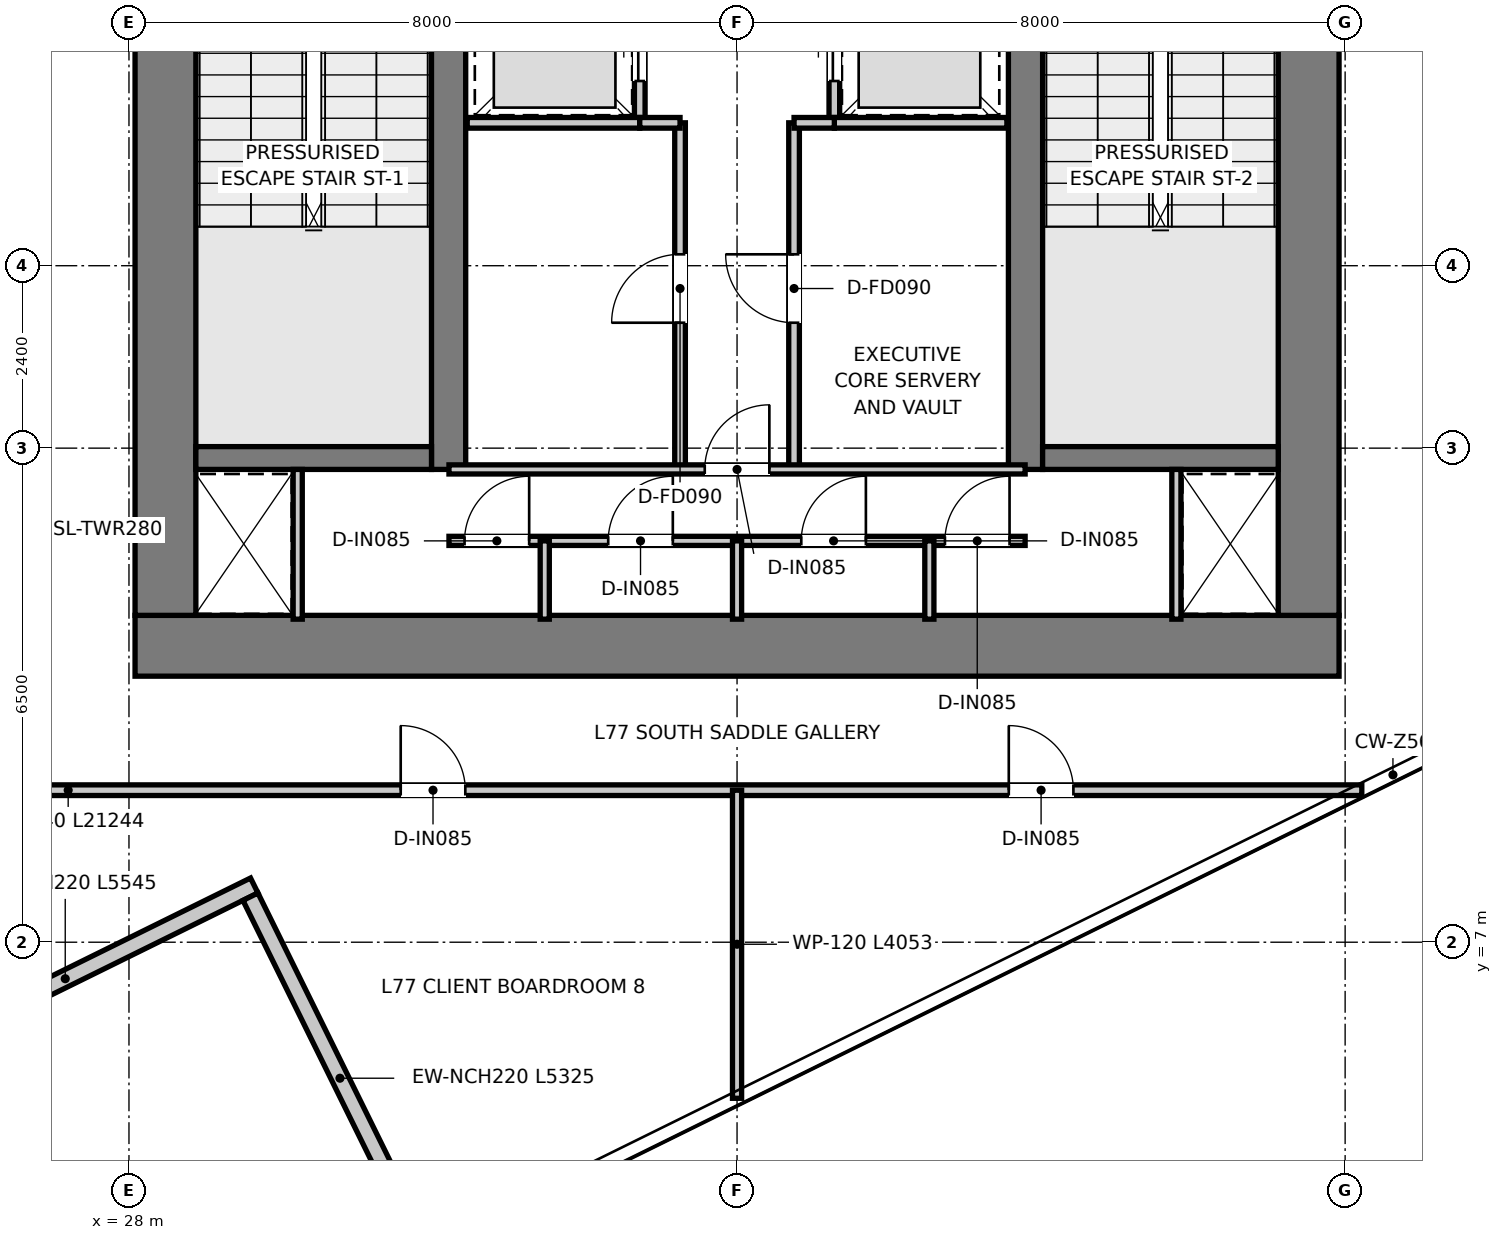
"""IFC4 building model, lengths in metres.
Left out: names, types, materials, properties, quantities, classifications, styles, units other than length and angle.
Written with IfcOpenShell. Run it as: python <this file> out.ifc"""

import sys

from ifc_helpers import new_model, si_unit, direction, frame, frame_2d, origin, place, context, subcontext, project, spatial, rectangle, extrude, element, fill, save


model = new_model("IFC4")
c1 = context("Model", 3, precision=1e-05, world=origin(), true_north=direction((0.0, 1.0)))
c2 = subcontext(c1, "Body", "Model", "MODEL_VIEW")
j1 = project(units=[si_unit("LENGTHUNIT", "METRE"), si_unit("PLANEANGLEUNIT", "RADIAN")], contexts=[c1])
p1 = place(None, origin())
s1 = spatial("IfcSite", under=j1, at=p1, CompositionType="ELEMENT")
p2 = place(p1, origin())
s2 = spatial("IfcBuilding", under=s1, at=p2, CompositionType="ELEMENT")
p3 = place(p2, frame((0.0, 0.0, 314.8)))
s3 = spatial("IfcBuildingStorey", under=s2, at=p3, CompositionType="ELEMENT", Elevation=314.8)
p4 = place(p3, frame((28.08, 10.9, 0.0), z_axis=(0.0, 0.0, 1.0), x_axis=(1.0, 0.0, 0.0)))
e1 = element("IfcWall", 1, at=p4, inside=s3, PredefinedType="SHEAR", context=c2, shape_type="SweptSolid", body=[
    extrude(rectangle(XDim=15.84, YDim=0.8, at=frame_2d((7.92, 0.0))), origin(), (0.0, 0.0, 1.0), 3.95),
])
for number, where, z_axis, x_axis in (
    (2, (28.48, 11.3, 0.0), (0.0, 0.0, 1.0), (0.0, 1.0, 0.0)),
    (3, (43.52, 11.3, 0.0), (0.0, 0.0, 1.0), (0.0, 1.0, 0.0)),
):
    element("IfcWall", number, at=place(p3, frame(where, z_axis=z_axis, x_axis=x_axis)), inside=s3, PredefinedType="SHEAR", context=c2, shape_type="SweptSolid", body=[
        extrude(rectangle(XDim=14.7, YDim=0.8, at=frame_2d((7.35, 0.0))), origin(), (0.0, 0.0, 1.0), 3.95),
    ])
p5 = place(p3, frame((32.205, 13.22, 0.0), z_axis=(0.0, 0.0, 1.0), x_axis=(0.0, 1.0, 0.0)))
e4 = element("IfcWall", 4, at=p5, inside=s3, PredefinedType="SHEAR", context=c2, shape_type="SweptSolid", body=[
    extrude(rectangle(XDim=12.78, YDim=0.45, at=frame_2d((6.39, 0.0))), origin(), (0.0, 0.0, 1.0), 3.95),
])
p6 = place(p5, frame((10.58, 0.0, 0.0)))
e5 = element("IfcOpeningElement", 5, at=p6, cuts=e4, PredefinedType="OPENING", context=c2, shape_type="SweptSolid", body=[
    extrude(rectangle(XDim=1.1, YDim=2.15, at=frame_2d((0.55, 1.075))), frame((0.0, 0.235, 0.0), z_axis=(0.0, -1.0, 0.0), x_axis=(1.0, 0.0, 0.0)), (0.0, 0.0, 1.0), 0.47),
])
p7 = place(p3, frame((39.795, 13.22, 0.0), z_axis=(0.0, 0.0, 1.0), x_axis=(0.0, 1.0, 0.0)))
e6 = element("IfcWall", 6, at=p7, inside=s3, PredefinedType="SHEAR", context=c2, shape_type="SweptSolid", body=[
    extrude(rectangle(XDim=12.78, YDim=0.45, at=frame_2d((6.39, 0.0))), origin(), (0.0, 0.0, 1.0), 3.95),
])
p8 = place(p7, frame((10.58, 0.0, 0.0)))
e7 = element("IfcOpeningElement", 7, at=p8, cuts=e6, PredefinedType="OPENING", context=c2, shape_type="SweptSolid", body=[
    extrude(rectangle(XDim=1.1, YDim=2.15, at=frame_2d((0.55, 1.075))), frame((0.0, 0.235, 0.0), z_axis=(0.0, -1.0, 0.0), x_axis=(1.0, 0.0, 0.0)), (0.0, 0.0, 1.0), 0.47),
])
for number, where, z_axis, x_axis in (
    (8, (28.88, 13.37, 0.0), (0.0, 0.0, 1.0), (1.0, 0.0, 0.0)),
    (9, (40.02, 13.37, 0.0), (0.0, 0.0, 1.0), (1.0, 0.0, 0.0)),
):
    element("IfcWall", number, at=place(p3, frame(where, z_axis=z_axis, x_axis=x_axis)), inside=s3, PredefinedType="SHEAR", context=c2, shape_type="SweptSolid", body=[
        extrude(rectangle(XDim=3.1, YDim=0.3, at=frame_2d((1.55, 0.0))), origin(), (0.0, 0.0, 1.0), 3.95),
    ])
p9 = place(p3, frame((24.675, 5.293, 0.0), z_axis=(0.0, 0.0, 1.0), x_axis=(0.896879244314, 0.442275503639, 0.0)))
e10 = element("IfcWall", 10, at=p9, inside=s3, PredefinedType="ELEMENTEDWALL", context=c2, shape_type="SweptSolid", body=[
    extrude(rectangle(XDim=5.545, YDim=0.22, at=frame_2d((2.772, 0.0))), origin(), (0.0, 0.0, 1.0), 3.59),
])
p10 = place(p3, frame((29.598, 7.599, 0.0), z_axis=(0.0, 0.0, 1.0), x_axis=(0.442291978932, -0.896871119712, 0.0)))
e11 = element("IfcWall", 11, at=p10, inside=s3, PredefinedType="ELEMENTEDWALL", context=c2, shape_type="SweptSolid", body=[
    extrude(rectangle(XDim=5.325, YDim=0.22, at=frame_2d((2.663, 0.0))), origin(), (0.0, 0.0, 1.0), 3.59),
])
p11 = place(p3, frame((34.72, 17.78, 0.0), z_axis=(0.0, 0.0, 1.0), x_axis=(0.0, 1.0, 0.0)))
e12 = element("IfcWall", 12, at=p11, inside=s3, PredefinedType="PARTITIONING", context=c2, shape_type="SweptSolid", body=[
    extrude(rectangle(XDim=2.42, YDim=0.14, at=frame_2d((1.21, 0.0))), origin(), (0.0, 0.0, 1.0), 3.59),
])
p12 = place(p11, frame((0.55, 0.0, 0.0)))
e13 = element("IfcOpeningElement", 13, at=p12, cuts=e12, PredefinedType="OPENING", context=c2, shape_type="SweptSolid", body=[
    extrude(rectangle(XDim=1.1, YDim=2.15, at=frame_2d((0.55, 1.075))), frame((0.0, 0.08, 0.0), z_axis=(0.0, -1.0, 0.0), x_axis=(1.0, 0.0, 0.0)), (0.0, 0.0, 1.0), 0.16),
])
p13 = place(p3, frame((37.28, 17.78, 0.0), z_axis=(0.0, 0.0, 1.0), x_axis=(0.0, 1.0, 0.0)))
e14 = element("IfcWall", 14, at=p13, inside=s3, PredefinedType="PARTITIONING", context=c2, shape_type="SweptSolid", body=[
    extrude(rectangle(XDim=2.42, YDim=0.14, at=frame_2d((1.21, 0.0))), origin(), (0.0, 0.0, 1.0), 3.59),
])
p14 = place(p13, frame((0.55, 0.0, 0.0)))
e15 = element("IfcOpeningElement", 15, at=p14, cuts=e14, PredefinedType="OPENING", context=c2, shape_type="SweptSolid", body=[
    extrude(rectangle(XDim=1.1, YDim=2.15, at=frame_2d((0.55, 1.075))), frame((0.0, 0.08, 0.0), z_axis=(0.0, -1.0, 0.0), x_axis=(1.0, 0.0, 0.0)), (0.0, 0.0, 1.0), 0.16),
])
for number, where, z_axis, x_axis in (
    (16, (32.45, 17.78, 0.0), (0.0, 0.0, 1.0), (1.0, 0.0, 0.0)),
    (17, (37.28, 17.78, 0.0), (0.0, 0.0, 1.0), (1.0, 0.0, 0.0)),
):
    element("IfcWall", number, at=place(p3, frame(where, z_axis=z_axis, x_axis=x_axis)), inside=s3, PredefinedType="PARTITIONING", context=c2, shape_type="SweptSolid", body=[
        extrude(rectangle(XDim=2.27, YDim=0.14, at=frame_2d((1.135, 0.0))), origin(), (0.0, 0.0, 1.0), 3.59),
    ])
p15 = place(p3, frame((35.25, 13.22, 0.0), z_axis=(0.0, 0.0, 1.0), x_axis=(0.0, 1.0, 0.0)))
e18 = element("IfcWall", 18, at=p15, inside=s3, PredefinedType="PARTITIONING", context=c2, shape_type="SweptSolid", body=[
    extrude(rectangle(XDim=4.56, YDim=0.14, at=frame_2d((2.28, 0.0))), origin(), (0.0, 0.0, 1.0), 3.59),
])
p16 = place(p15, frame((1.93, 0.0, 0.0)))
e19 = element("IfcOpeningElement", 19, at=p16, cuts=e18, PredefinedType="OPENING", context=c2, shape_type="SweptSolid", body=[
    extrude(rectangle(XDim=0.9, YDim=2.1, at=frame_2d((0.45, 1.05))), frame((0.0, 0.08, 0.0), z_axis=(0.0, -1.0, 0.0), x_axis=(1.0, 0.0, 0.0)), (0.0, 0.0, 1.0), 0.16),
])
p17 = place(p3, frame((34.72, 17.78, 0.0), z_axis=(0.0, 0.0, 1.0), x_axis=(1.0, 0.0, 0.0)))
e20 = element("IfcWall", 20, at=p17, inside=s3, PredefinedType="PARTITIONING", context=c2, shape_type="SweptSolid", body=[
    extrude(rectangle(XDim=0.53, YDim=0.14, at=frame_2d((0.265, 0.0))), origin(), (0.0, 0.0, 1.0), 3.59),
])
p18 = place(p3, frame((36.75, 13.22, 0.0), z_axis=(0.0, 0.0, 1.0), x_axis=(0.0, 1.0, 0.0)))
e21 = element("IfcWall", 21, at=p18, inside=s3, PredefinedType="PARTITIONING", context=c2, shape_type="SweptSolid", body=[
    extrude(rectangle(XDim=4.56, YDim=0.14, at=frame_2d((2.28, 0.0))), origin(), (0.0, 0.0, 1.0), 3.59),
])
p19 = place(p18, frame((1.93, 0.0, 0.0)))
e22 = element("IfcOpeningElement", 22, at=p19, cuts=e21, PredefinedType="OPENING", context=c2, shape_type="SweptSolid", body=[
    extrude(rectangle(XDim=0.9, YDim=2.1, at=frame_2d((0.45, 1.05))), frame((0.0, 0.08, 0.0), z_axis=(0.0, -1.0, 0.0), x_axis=(1.0, 0.0, 0.0)), (0.0, 0.0, 1.0), 0.16),
])
p20 = place(p3, frame((36.75, 17.78, 0.0), z_axis=(0.0, 0.0, 1.0), x_axis=(1.0, 0.0, 0.0)))
e23 = element("IfcWall", 23, at=p20, inside=s3, PredefinedType="PARTITIONING", context=c2, shape_type="SweptSolid", body=[
    extrude(rectangle(XDim=0.53, YDim=0.14, at=frame_2d((0.265, 0.0))), origin(), (0.0, 0.0, 1.0), 3.59),
])
for number, where, z_axis, x_axis in (
    (24, (30.22, 11.25, 0.0), (0.0, 0.0, 1.0), (0.0, 1.0, 0.0)),
    (25, (41.78, 11.25, 0.0), (0.0, 0.0, 1.0), (0.0, 1.0, 0.0)),
):
    element("IfcWall", number, at=place(p3, frame(where, z_axis=z_axis, x_axis=x_axis)), inside=s3, PredefinedType="PARTITIONING", context=c2, shape_type="SweptSolid", body=[
        extrude(rectangle(XDim=1.97, YDim=0.12, at=frame_2d((0.985, 0.0))), origin(), (0.0, 0.0, 1.0), 3.59),
    ])
p21 = place(p3, frame((32.21, 13.22, 0.0), z_axis=(0.0, 0.0, 1.0), x_axis=(1.0, 0.0, 0.0)))
e26 = element("IfcWall", 26, at=p21, inside=s3, PredefinedType="PARTITIONING", context=c2, shape_type="SweptSolid", body=[
    extrude(rectangle(XDim=7.58, YDim=0.12, at=frame_2d((3.79, 0.0))), origin(), (0.0, 0.0, 1.0), 3.59),
])
p22 = place(p21, frame((3.365, 0.0, 0.0)))
e27 = element("IfcOpeningElement", 27, at=p22, cuts=e26, PredefinedType="OPENING", context=c2, shape_type="SweptSolid", body=[
    extrude(rectangle(XDim=0.85, YDim=2.1, at=frame_2d((0.425, 1.05))), frame((0.0, 0.07, 0.0), z_axis=(0.0, -1.0, 0.0), x_axis=(1.0, 0.0, 0.0)), (0.0, 0.0, 1.0), 0.14),
])
p23 = place(p3, frame((32.21, 12.28, 0.0), z_axis=(0.0, 0.0, 1.0), x_axis=(1.0, 0.0, 0.0)))
e28 = element("IfcWall", 28, at=p23, inside=s3, PredefinedType="PARTITIONING", context=c2, shape_type="SweptSolid", body=[
    extrude(rectangle(XDim=7.58, YDim=0.12, at=frame_2d((3.79, 0.0))), origin(), (0.0, 0.0, 1.0), 3.59),
])
p24 = place(p23, frame((0.205, 0.0, 0.0)))
e29 = element("IfcOpeningElement", 29, at=p24, cuts=e28, PredefinedType="OPENING", context=c2, shape_type="SweptSolid", body=[
    extrude(rectangle(XDim=0.85, YDim=2.1, at=frame_2d((0.425, 1.05))), frame((0.0, 0.07, 0.0), z_axis=(0.0, -1.0, 0.0), x_axis=(1.0, 0.0, 0.0)), (0.0, 0.0, 1.0), 0.14),
])
p25 = place(p23, frame((2.095, 0.0, 0.0)))
e30 = element("IfcOpeningElement", 30, at=p25, cuts=e28, PredefinedType="OPENING", context=c2, shape_type="SweptSolid", body=[
    extrude(rectangle(XDim=0.85, YDim=2.1, at=frame_2d((0.425, 1.05))), frame((0.0, 0.07, 0.0), z_axis=(0.0, -1.0, 0.0), x_axis=(1.0, 0.0, 0.0)), (0.0, 0.0, 1.0), 0.14),
])
p26 = place(p23, frame((4.635, 0.0, 0.0)))
e31 = element("IfcOpeningElement", 31, at=p26, cuts=e28, PredefinedType="OPENING", context=c2, shape_type="SweptSolid", body=[
    extrude(rectangle(XDim=0.85, YDim=2.1, at=frame_2d((0.425, 1.05))), frame((0.0, 0.07, 0.0), z_axis=(0.0, -1.0, 0.0), x_axis=(1.0, 0.0, 0.0)), (0.0, 0.0, 1.0), 0.14),
])
p27 = place(p23, frame((6.525, 0.0, 0.0)))
e32 = element("IfcOpeningElement", 32, at=p27, cuts=e28, PredefinedType="OPENING", context=c2, shape_type="SweptSolid", body=[
    extrude(rectangle(XDim=0.85, YDim=2.1, at=frame_2d((0.425, 1.05))), frame((0.0, 0.07, 0.0), z_axis=(0.0, -1.0, 0.0), x_axis=(1.0, 0.0, 0.0)), (0.0, 0.0, 1.0), 0.14),
])
for number, where, z_axis, x_axis in (
    (33, (33.47, 11.25, 0.0), (0.0, 0.0, 1.0), (0.0, 1.0, 0.0)),
    (34, (36.0, 11.25, 0.0), (0.0, 0.0, 1.0), (0.0, 1.0, 0.0)),
    (35, (38.53, 11.25, 0.0), (0.0, 0.0, 1.0), (0.0, 1.0, 0.0)),
):
    element("IfcWall", number, at=place(p3, frame(where, z_axis=z_axis, x_axis=x_axis)), inside=s3, PredefinedType="PARTITIONING", context=c2, shape_type="SweptSolid", body=[
        extrude(rectangle(XDim=1.03, YDim=0.12, at=frame_2d((0.515, 0.0))), origin(), (0.0, 0.0, 1.0), 3.59),
    ])
p28 = place(p3, frame((22.975, 9.0, 0.0), z_axis=(0.0, 0.0, 1.0), x_axis=(1.0, 0.0, 0.0)))
e36 = element("IfcWall", 36, at=p28, inside=s3, PredefinedType="PARTITIONING", context=c2, shape_type="SweptSolid", body=[
    extrude(rectangle(XDim=21.244, YDim=0.14, at=frame_2d((10.622, 0.0))), origin(), (0.0, 0.0, 1.0), 3.59),
])
p29 = place(p28, frame((8.6, 0.0, 0.0)))
e37 = element("IfcOpeningElement", 37, at=p29, cuts=e36, PredefinedType="OPENING", context=c2, shape_type="SweptSolid", body=[
    extrude(rectangle(XDim=0.85, YDim=2.1, at=frame_2d((0.425, 1.05))), frame((0.0, 0.08, 0.0), z_axis=(0.0, -1.0, 0.0), x_axis=(1.0, 0.0, 0.0)), (0.0, 0.0, 1.0), 0.16),
])
p30 = place(p28, frame((16.6, 0.0, 0.0)))
e38 = element("IfcOpeningElement", 38, at=p30, cuts=e36, PredefinedType="OPENING", context=c2, shape_type="SweptSolid", body=[
    extrude(rectangle(XDim=0.85, YDim=2.1, at=frame_2d((0.425, 1.05))), frame((0.0, 0.08, 0.0), z_axis=(0.0, -1.0, 0.0), x_axis=(1.0, 0.0, 0.0)), (0.0, 0.0, 1.0), 0.16),
])
p31 = place(p3, frame((36.0, 4.947, 0.0), z_axis=(0.0, 0.0, 1.0), x_axis=(0.0, 1.0, 0.0)))
e39 = element("IfcWall", 39, at=p31, inside=s3, PredefinedType="PARTITIONING", context=c2, shape_type="SweptSolid", body=[
    extrude(rectangle(XDim=4.053, YDim=0.12, at=frame_2d((2.027, 0.0))), origin(), (0.0, 0.0, 1.0), 3.59),
])
p32 = place(p12, origin())
e40 = element("IfcDoor", 40, at=p32, inside=s3, OperationType="DOUBLE_DOOR_SLIDING", PredefinedType="DOOR", context=c2, shape_type="SweptSolid", body=[
    extrude(rectangle(XDim=1.1, YDim=2.15, at=frame_2d((0.55, 1.075))), frame((0.0, 0.025, 0.0), z_axis=(0.0, -1.0, 0.0), x_axis=(1.0, 0.0, 0.0)), (0.0, 0.0, 1.0), 0.05),
])
fill(e13, e40)
p33 = place(p14, origin())
e41 = element("IfcDoor", 41, at=p33, inside=s3, OperationType="DOUBLE_DOOR_SLIDING", PredefinedType="DOOR", context=c2, shape_type="SweptSolid", body=[
    extrude(rectangle(XDim=1.1, YDim=2.15, at=frame_2d((0.55, 1.075))), frame((0.0, 0.025, 0.0), z_axis=(0.0, -1.0, 0.0), x_axis=(1.0, 0.0, 0.0)), (0.0, 0.0, 1.0), 0.05),
])
fill(e15, e41)
p34 = place(p16, origin())
e42 = element("IfcDoor", 42, at=p34, inside=s3, OperationType="SINGLE_SWING_LEFT", PredefinedType="DOOR", context=c2, shape_type="SweptSolid", body=[
    extrude(rectangle(XDim=0.9, YDim=2.1, at=frame_2d((0.45, 1.05))), frame((0.0, 0.025, 0.0), z_axis=(0.0, -1.0, 0.0), x_axis=(1.0, 0.0, 0.0)), (0.0, 0.0, 1.0), 0.05),
])
fill(e19, e42)
p35 = place(p19, origin())
e43 = element("IfcDoor", 43, at=p35, inside=s3, OperationType="SINGLE_SWING_RIGHT", PredefinedType="DOOR", context=c2, shape_type="SweptSolid", body=[
    extrude(rectangle(XDim=0.9, YDim=2.1, at=frame_2d((0.45, 1.05))), frame((0.0, 0.025, 0.0), z_axis=(0.0, -1.0, 0.0), x_axis=(1.0, 0.0, 0.0)), (0.0, 0.0, 1.0), 0.05),
])
fill(e22, e43)
p36 = place(p22, origin())
e44 = element("IfcDoor", 44, at=p36, inside=s3, OperationType="SINGLE_SWING_RIGHT", PredefinedType="DOOR", context=c2, shape_type="SweptSolid", body=[
    extrude(rectangle(XDim=0.85, YDim=2.1, at=frame_2d((0.425, 1.05))), frame((0.0, 0.025, 0.0), z_axis=(0.0, -1.0, 0.0), x_axis=(1.0, 0.0, 0.0)), (0.0, 0.0, 1.0), 0.05),
])
fill(e27, e44)
p37 = place(p24, origin())
e45 = element("IfcDoor", 45, at=p37, inside=s3, OperationType="SINGLE_SWING_RIGHT", PredefinedType="DOOR", context=c2, shape_type="SweptSolid", body=[
    extrude(rectangle(XDim=0.85, YDim=2.1, at=frame_2d((0.425, 1.05))), frame((0.0, 0.025, 0.0), z_axis=(0.0, -1.0, 0.0), x_axis=(1.0, 0.0, 0.0)), (0.0, 0.0, 1.0), 0.05),
])
fill(e29, e45)
p38 = place(p25, origin())
e46 = element("IfcDoor", 46, at=p38, inside=s3, OperationType="SINGLE_SWING_RIGHT", PredefinedType="DOOR", context=c2, shape_type="SweptSolid", body=[
    extrude(rectangle(XDim=0.85, YDim=2.1, at=frame_2d((0.425, 1.05))), frame((0.0, 0.025, 0.0), z_axis=(0.0, -1.0, 0.0), x_axis=(1.0, 0.0, 0.0)), (0.0, 0.0, 1.0), 0.05),
])
fill(e30, e46)
p39 = place(p26, origin())
e47 = element("IfcDoor", 47, at=p39, inside=s3, OperationType="SINGLE_SWING_RIGHT", PredefinedType="DOOR", context=c2, shape_type="SweptSolid", body=[
    extrude(rectangle(XDim=0.85, YDim=2.1, at=frame_2d((0.425, 1.05))), frame((0.0, 0.025, 0.0), z_axis=(0.0, -1.0, 0.0), x_axis=(1.0, 0.0, 0.0)), (0.0, 0.0, 1.0), 0.05),
])
fill(e31, e47)
p40 = place(p27, origin())
e48 = element("IfcDoor", 48, at=p40, inside=s3, OperationType="SINGLE_SWING_RIGHT", PredefinedType="DOOR", context=c2, shape_type="SweptSolid", body=[
    extrude(rectangle(XDim=0.85, YDim=2.1, at=frame_2d((0.425, 1.05))), frame((0.0, 0.025, 0.0), z_axis=(0.0, -1.0, 0.0), x_axis=(1.0, 0.0, 0.0)), (0.0, 0.0, 1.0), 0.05),
])
fill(e32, e48)
p41 = place(p29, origin())
e49 = element("IfcDoor", 49, at=p41, inside=s3, OperationType="SINGLE_SWING_LEFT", PredefinedType="DOOR", context=c2, shape_type="SweptSolid", body=[
    extrude(rectangle(XDim=0.85, YDim=2.1, at=frame_2d((0.425, 1.05))), frame((0.0, 0.025, 0.0), z_axis=(0.0, -1.0, 0.0), x_axis=(1.0, 0.0, 0.0)), (0.0, 0.0, 1.0), 0.05),
])
fill(e37, e49)
p42 = place(p30, origin())
e50 = element("IfcDoor", 50, at=p42, inside=s3, OperationType="SINGLE_SWING_LEFT", PredefinedType="DOOR", context=c2, shape_type="SweptSolid", body=[
    extrude(rectangle(XDim=0.85, YDim=2.1, at=frame_2d((0.425, 1.05))), frame((0.0, 0.025, 0.0), z_axis=(0.0, -1.0, 0.0), x_axis=(1.0, 0.0, 0.0)), (0.0, 0.0, 1.0), 0.05),
])
fill(e38, e50)
save(model, sys.argv[1])
